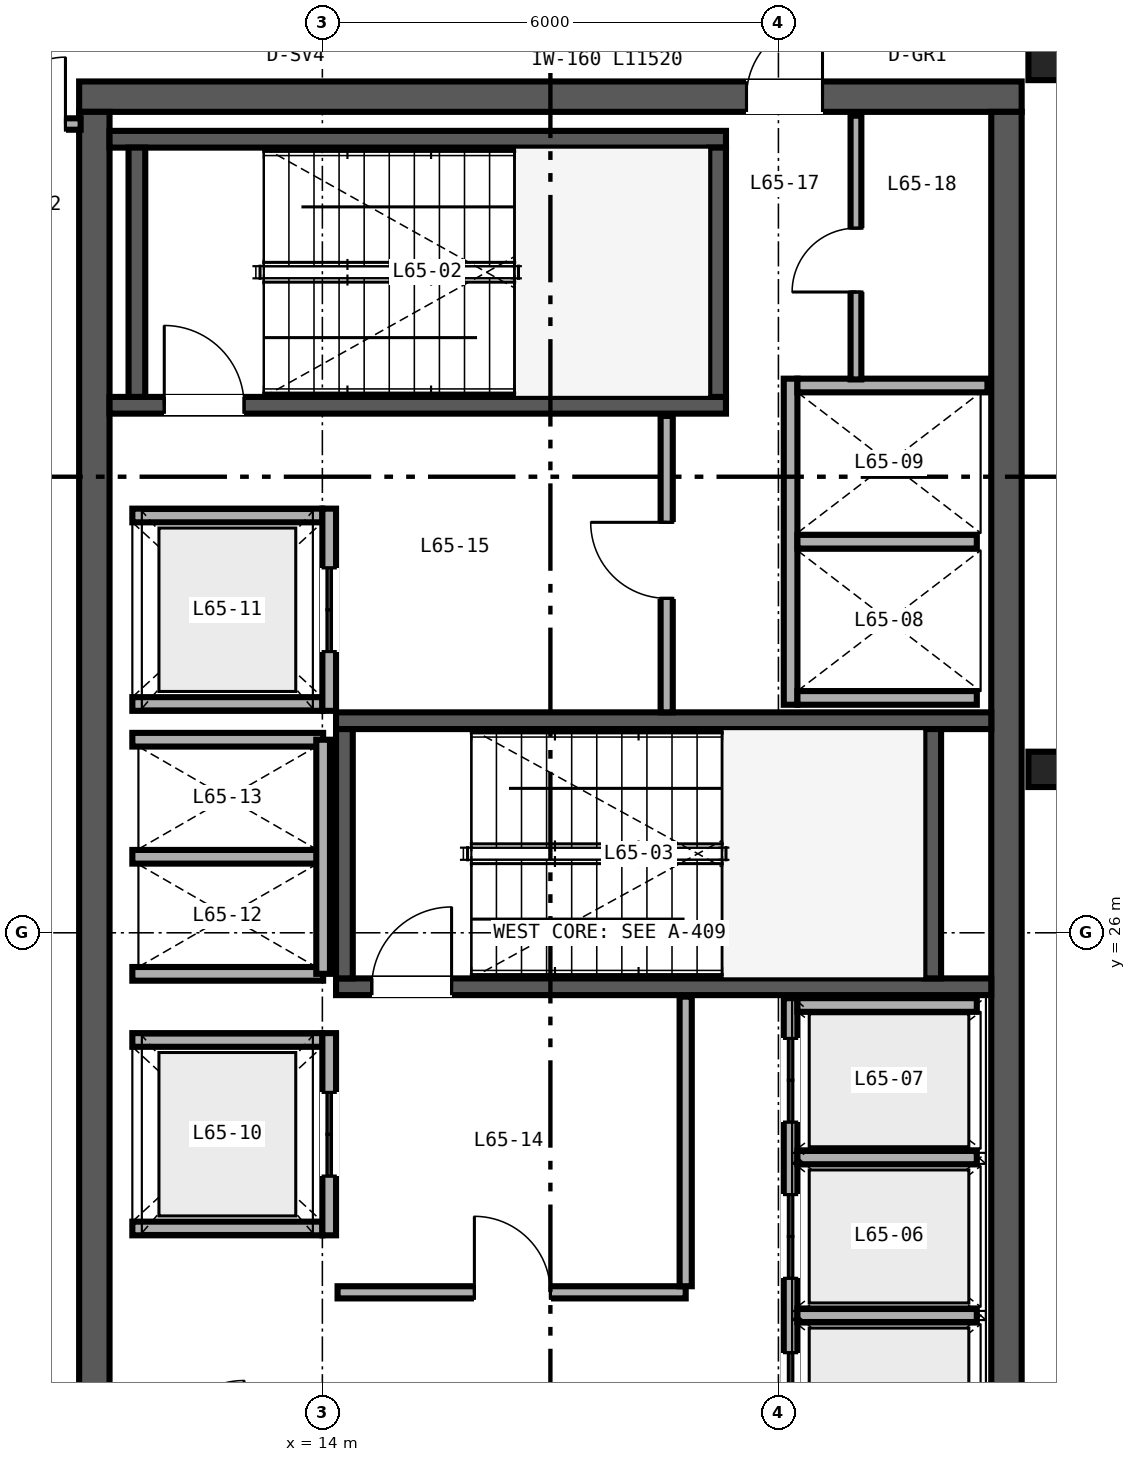
"""IFC4 building model, lengths in metres.
Left out: names, types, materials, properties, quantities, classifications, styles, units other than length and angle.
Written with IfcOpenShell. Run it as: python <this file> out.ifc"""

import sys

from ifc_helpers import new_model, si_unit, direction, frame, frame_2d, origin, origin_2d, place, context, subcontext, project, spatial, rectangle, i_section, extrude, source, transform, mapped, element, fill, save


model = new_model("IFC4")
c1 = context("Model", 3, precision=1e-05, world=origin(), true_north=direction((0.0, 1.0)))
c2 = subcontext(c1, "Body", "Model", "MODEL_VIEW")
j1 = project(units=[si_unit("LENGTHUNIT", "METRE"), si_unit("PLANEANGLEUNIT", "RADIAN")], contexts=[c1])
p1 = place(None, origin())
s1 = spatial("IfcSite", under=j1, at=p1, CompositionType="ELEMENT")
p2 = place(p1, origin())
s2 = spatial("IfcBuilding", under=s1, at=p2, CompositionType="ELEMENT")
p3 = place(p2, frame((0.0, 0.0, 258.0)))
s3 = spatial("IfcBuildingStorey", under=s2, at=p3, CompositionType="ELEMENT", Elevation=258.0)
p4 = place(p3, frame((10.8, 37.0, 0.0), z_axis=(0.0, 0.0, 1.0), x_axis=(1.0, 0.0, 0.0)))
e1 = element("IfcWall", 1, at=p4, inside=s3, PredefinedType="SHEAR", context=c2, shape_type="SweptSolid", body=[
    extrude(rectangle(XDim=12.4, YDim=0.4, at=frame_2d((6.2, 0.0))), origin(), (0.0, 0.0, 1.0), 3.38),
])
p5 = place(p4, frame((8.78, 0.0, 0.0)))
e2 = element("IfcOpeningElement", 2, at=p5, cuts=e1, PredefinedType="OPENING", context=c2, shape_type="SweptSolid", body=[
    extrude(rectangle(XDim=1.0, YDim=2.15, at=frame_2d((0.5, 1.075))), frame((0.0, 0.21, 0.0), z_axis=(0.0, -1.0, 0.0), x_axis=(1.0, 0.0, 0.0)), (0.0, 0.0, 1.0), 0.42),
])
for number, where, z_axis, x_axis in (
    (3, (11.0, 15.2, 0.0), (0.0, 0.0, 1.0), (0.0, 1.0, 0.0)),
    (4, (23.0, 15.2, 0.0), (0.0, 0.0, 1.0), (0.0, 1.0, 0.0)),
):
    element("IfcWall", number, at=place(p3, frame(where, z_axis=z_axis, x_axis=x_axis)), inside=s3, PredefinedType="SHEAR", context=c2, shape_type="SweptSolid", body=[
        extrude(rectangle(XDim=21.6, YDim=0.4, at=frame_2d((10.8, 0.0))), origin(), (0.0, 0.0, 1.0), 3.38),
    ])
p6 = place(p3, frame((11.2, 32.94, 0.0), z_axis=(0.0, 0.0, 1.0), x_axis=(1.0, 0.0, 0.0)))
e5 = element("IfcWall", 5, at=p6, inside=s3, PredefinedType="SHEAR", context=c2, shape_type="SweptSolid", body=[
    extrude(rectangle(XDim=8.11, YDim=0.22, at=frame_2d((4.055, 0.0))), origin(), (0.0, 0.0, 1.0), 3.4),
])
p7 = place(p6, frame((0.72, 0.0, 0.0)))
e6 = element("IfcOpeningElement", 6, at=p7, cuts=e5, PredefinedType="OPENING", context=c2, shape_type="SweptSolid", body=[
    extrude(rectangle(XDim=1.05, YDim=2.15, at=frame_2d((0.525, 1.075))), frame((0.0, 0.12, 0.0), z_axis=(0.0, -1.0, 0.0), x_axis=(1.0, 0.0, 0.0)), (0.0, 0.0, 1.0), 0.24),
])
p8 = place(p3, frame((11.2, 36.44, 0.0), z_axis=(0.0, 0.0, 1.0), x_axis=(1.0, 0.0, 0.0)))
e7 = element("IfcWall", 7, at=p8, inside=s3, PredefinedType="SHEAR", context=c2, shape_type="SweptSolid", body=[
    extrude(rectangle(XDim=8.11, YDim=0.22, at=frame_2d((4.055, 0.0))), origin(), (0.0, 0.0, 1.0), 3.4),
])
for number, where, z_axis, x_axis in (
    (8, (11.56, 33.05, 0.0), (0.0, 0.0, 1.0), (0.0, 1.0, 0.0)),
    (9, (19.2, 33.05, 0.0), (0.0, 0.0, 1.0), (0.0, 1.0, 0.0)),
):
    element("IfcWall", number, at=place(p3, frame(where, z_axis=z_axis, x_axis=x_axis)), inside=s3, PredefinedType="SHEAR", context=c2, shape_type="SweptSolid", body=[
        extrude(rectangle(XDim=3.28, YDim=0.22, at=frame_2d((1.64, 0.0))), origin(), (0.0, 0.0, 1.0), 3.4),
    ])
p9 = place(p3, frame((14.18, 25.29, 0.0), z_axis=(0.0, 0.0, 1.0), x_axis=(1.0, 0.0, 0.0)))
e10 = element("IfcWall", 10, at=p9, inside=s3, PredefinedType="SHEAR", context=c2, shape_type="SweptSolid", body=[
    extrude(rectangle(XDim=8.62, YDim=0.22, at=frame_2d((4.31, 0.0))), origin(), (0.0, 0.0, 1.0), 3.4),
])
p10 = place(p9, frame((0.47, 0.0, 0.0)))
e11 = element("IfcOpeningElement", 11, at=p10, cuts=e10, PredefinedType="OPENING", context=c2, shape_type="SweptSolid", body=[
    extrude(rectangle(XDim=1.05, YDim=2.15, at=frame_2d((0.525, 1.075))), frame((0.0, 0.12, 0.0), z_axis=(0.0, -1.0, 0.0), x_axis=(1.0, 0.0, 0.0)), (0.0, 0.0, 1.0), 0.24),
])
p11 = place(p3, frame((14.18, 28.79, 0.0), z_axis=(0.0, 0.0, 1.0), x_axis=(1.0, 0.0, 0.0)))
e12 = element("IfcWall", 12, at=p11, inside=s3, PredefinedType="SHEAR", context=c2, shape_type="SweptSolid", body=[
    extrude(rectangle(XDim=8.62, YDim=0.22, at=frame_2d((4.31, 0.0))), origin(), (0.0, 0.0, 1.0), 3.4),
])
for number, where, z_axis, x_axis in (
    (13, (14.29, 25.4, 0.0), (0.0, 0.0, 1.0), (0.0, 1.0, 0.0)),
    (14, (22.03, 25.4, 0.0), (0.0, 0.0, 1.0), (0.0, 1.0, 0.0)),
):
    element("IfcWall", number, at=place(p3, frame(where, z_axis=z_axis, x_axis=x_axis)), inside=s3, PredefinedType="SHEAR", context=c2, shape_type="SweptSolid", body=[
        extrude(rectangle(XDim=3.28, YDim=0.22, at=frame_2d((1.64, 0.0))), origin(), (0.0, 0.0, 1.0), 3.4),
    ])
m1 = source(origin(), c2, "Body", "SweptSolid", [
    extrude(i_section(OverallWidth=0.422, OverallDepth=0.465, WebThickness=0.045, FlangeThickness=0.073, FilletRadius=0.025, at=origin_2d()), origin(), (0.0, 0.0, 1.0), 3.38),
])
for number, where, z_axis, x_axis in (
    (15, (23.5, 28.15, 0.0), (0.0, 0.0, 1.0), (1.0, 0.0, 0.0)),
    (16, (23.5, 37.45, 0.0), (0.0, 0.0, 1.0), (1.0, 0.0, 0.0)),
):
    element("IfcColumn", number, at=place(p3, frame(where, z_axis=z_axis, x_axis=x_axis)), inside=s3, PredefinedType="COLUMN", context=c2, shape_type="MappedRepresentation", body=[
        mapped(m1, transform((0.0, 0.0, 0.0), scale=1.0)),
    ])
p12 = place(p3, frame((20.16, 18.82, 0.0), z_axis=(0.0, 0.0, 1.0), x_axis=(0.0, 1.0, 0.0)))
e17 = element("IfcWall", 17, at=p12, inside=s3, PredefinedType="SOLIDWALL", context=c2, shape_type="SweptSolid", body=[
    extrude(rectangle(XDim=6.32, YDim=0.18, at=frame_2d((3.16, 0.0))), origin(), (0.0, 0.0, 1.0), 2.48),
])
p13 = place(p12, frame((0.555, 0.0, 0.0)))
e18 = element("IfcOpeningElement", 18, at=p13, cuts=e17, PredefinedType="OPENING", context=c2, shape_type="SweptSolid", body=[
    extrude(rectangle(XDim=1.1, YDim=2.2, at=frame_2d((0.55, 1.1))), frame((0.0, 0.1, 0.0), z_axis=(0.0, -1.0, 0.0), x_axis=(1.0, 0.0, 0.0)), (0.0, 0.0, 1.0), 0.2),
])
p14 = place(p12, frame((2.635, 0.0, 0.0)))
e19 = element("IfcOpeningElement", 19, at=p14, cuts=e17, PredefinedType="OPENING", context=c2, shape_type="SweptSolid", body=[
    extrude(rectangle(XDim=1.1, YDim=2.2, at=frame_2d((0.55, 1.1))), frame((0.0, 0.1, 0.0), z_axis=(0.0, -1.0, 0.0), x_axis=(1.0, 0.0, 0.0)), (0.0, 0.0, 1.0), 0.2),
])
p15 = place(p12, frame((4.69, 0.0, 0.0)))
e20 = element("IfcOpeningElement", 20, at=p15, cuts=e17, PredefinedType="OPENING", context=c2, shape_type="SweptSolid", body=[
    extrude(rectangle(XDim=1.1, YDim=2.2, at=frame_2d((0.55, 1.1))), frame((0.0, 0.1, 0.0), z_axis=(0.0, -1.0, 0.0), x_axis=(1.0, 0.0, 0.0)), (0.0, 0.0, 1.0), 0.2),
])
p16 = place(p3, frame((20.25, 25.05, 0.0), z_axis=(0.0, 0.0, 1.0), x_axis=(1.0, 0.0, 0.0)))
e21 = element("IfcWall", 21, at=p16, inside=s3, PredefinedType="SOLIDWALL", context=c2, shape_type="SweptSolid", body=[
    extrude(rectangle(XDim=2.36, YDim=0.18, at=frame_2d((1.18, 0.0))), origin(), (0.0, 0.0, 1.0), 3.38),
])
p17 = place(p3, frame((20.25, 20.965, 0.0), z_axis=(0.0, 0.0, 1.0), x_axis=(1.0, 0.0, 0.0)))
e22 = element("IfcWall", 22, at=p17, inside=s3, PredefinedType="SOLIDWALL", context=c2, shape_type="SweptSolid", body=[
    extrude(rectangle(XDim=2.36, YDim=0.18, at=frame_2d((1.18, 0.0))), origin(), (0.0, 0.0, 1.0), 2.48),
])
p18 = place(p3, frame((20.25, 23.045, 0.0), z_axis=(0.0, 0.0, 1.0), x_axis=(1.0, 0.0, 0.0)))
e23 = element("IfcWall", 23, at=p18, inside=s3, PredefinedType="SOLIDWALL", context=c2, shape_type="SweptSolid", body=[
    extrude(rectangle(XDim=2.36, YDim=0.18, at=frame_2d((1.18, 0.0))), origin(), (0.0, 0.0, 1.0), 3.38),
])
p19 = place(p3, frame((20.16, 29.0, 0.0), z_axis=(0.0, 0.0, 1.0), x_axis=(0.0, 1.0, 0.0)))
e24 = element("IfcWall", 24, at=p19, inside=s3, PredefinedType="SOLIDWALL", context=c2, shape_type="SweptSolid", body=[
    extrude(rectangle(XDim=4.29, YDim=0.18, at=frame_2d((2.145, 0.0))), origin(), (0.0, 0.0, 1.0), 3.38),
])
p20 = place(p3, frame((20.25, 29.09, 0.0), z_axis=(0.0, 0.0, 1.0), x_axis=(1.0, 0.0, 0.0)))
e25 = element("IfcWall", 25, at=p20, inside=s3, PredefinedType="SOLIDWALL", context=c2, shape_type="SweptSolid", body=[
    extrude(rectangle(XDim=2.36, YDim=0.18, at=frame_2d((1.18, 0.0))), origin(), (0.0, 0.0, 1.0), 3.38),
])
p21 = place(p3, frame((20.25, 33.2, 0.0), z_axis=(0.0, 0.0, 1.0), x_axis=(1.0, 0.0, 0.0)))
e26 = element("IfcWall", 26, at=p21, inside=s3, PredefinedType="SOLIDWALL", context=c2, shape_type="SweptSolid", body=[
    extrude(rectangle(XDim=2.5, YDim=0.18, at=frame_2d((1.25, 0.0))), origin(), (0.0, 0.0, 1.0), 3.38),
])
p22 = place(p3, frame((20.25, 31.145, 0.0), z_axis=(0.0, 0.0, 1.0), x_axis=(1.0, 0.0, 0.0)))
e27 = element("IfcWall", 27, at=p22, inside=s3, PredefinedType="SOLIDWALL", context=c2, shape_type="SweptSolid", body=[
    extrude(rectangle(XDim=2.36, YDim=0.18, at=frame_2d((1.18, 0.0))), origin(), (0.0, 0.0, 1.0), 3.38),
])
for number, where, z_axis, x_axis in (
    (28, (11.5, 22.11, 0.0), (0.0, 0.0, 1.0), (1.0, 0.0, 0.0)),
    (29, (11.5, 24.59, 0.0), (0.0, 0.0, 1.0), (1.0, 0.0, 0.0)),
):
    element("IfcWall", number, at=place(p3, frame(where, z_axis=z_axis, x_axis=x_axis)), inside=s3, PredefinedType="SOLIDWALL", context=c2, shape_type="SweptSolid", body=[
        extrude(rectangle(XDim=2.5, YDim=0.18, at=frame_2d((1.25, 0.0))), origin(), (0.0, 0.0, 1.0), 3.38),
    ])
p23 = place(p3, frame((14.09, 22.02, 0.0), z_axis=(0.0, 0.0, 1.0), x_axis=(0.0, 1.0, 0.0)))
e30 = element("IfcWall", 30, at=p23, inside=s3, PredefinedType="SOLIDWALL", context=c2, shape_type="SweptSolid", body=[
    extrude(rectangle(XDim=2.66, YDim=0.18, at=frame_2d((1.33, 0.0))), origin(), (0.0, 0.0, 1.0), 3.38),
])
p24 = place(p23, frame((0.78, 0.0, 0.0)))
e31 = element("IfcOpeningElement", 31, at=p24, cuts=e30, PredefinedType="OPENING", context=c2, shape_type="SweptSolid", body=[
    extrude(rectangle(XDim=1.1, YDim=2.2, at=frame_2d((0.55, 1.1))), frame((0.0, 0.1, 0.0), z_axis=(0.0, -1.0, 0.0), x_axis=(1.0, 0.0, 0.0)), (0.0, 0.0, 1.0), 0.2),
])
for number, where, z_axis, x_axis in (
    (32, (11.5, 29.01, 0.0), (0.0, 0.0, 1.0), (1.0, 0.0, 0.0)),
    (33, (11.5, 31.49, 0.0), (0.0, 0.0, 1.0), (1.0, 0.0, 0.0)),
):
    element("IfcWall", number, at=place(p3, frame(where, z_axis=z_axis, x_axis=x_axis)), inside=s3, PredefinedType="SOLIDWALL", context=c2, shape_type="SweptSolid", body=[
        extrude(rectangle(XDim=2.5, YDim=0.18, at=frame_2d((1.25, 0.0))), origin(), (0.0, 0.0, 1.0), 3.38),
    ])
p25 = place(p3, frame((14.09, 28.92, 0.0), z_axis=(0.0, 0.0, 1.0), x_axis=(0.0, 1.0, 0.0)))
e34 = element("IfcWall", 34, at=p25, inside=s3, PredefinedType="SOLIDWALL", context=c2, shape_type="SweptSolid", body=[
    extrude(rectangle(XDim=2.66, YDim=0.18, at=frame_2d((1.33, 0.0))), origin(), (0.0, 0.0, 1.0), 3.38),
])
p26 = place(p25, frame((0.78, 0.0, 0.0)))
e35 = element("IfcOpeningElement", 35, at=p26, cuts=e34, PredefinedType="OPENING", context=c2, shape_type="SweptSolid", body=[
    extrude(rectangle(XDim=1.1, YDim=2.2, at=frame_2d((0.55, 1.1))), frame((0.0, 0.1, 0.0), z_axis=(0.0, -1.0, 0.0), x_axis=(1.0, 0.0, 0.0)), (0.0, 0.0, 1.0), 0.2),
])
for number, where, z_axis, x_axis in (
    (36, (11.5, 25.46, 0.0), (0.0, 0.0, 1.0), (1.0, 0.0, 0.0)),
    (37, (11.5, 27.0, 0.0), (0.0, 0.0, 1.0), (1.0, 0.0, 0.0)),
    (38, (11.5, 28.54, 0.0), (0.0, 0.0, 1.0), (1.0, 0.0, 0.0)),
):
    element("IfcWall", number, at=place(p3, frame(where, z_axis=z_axis, x_axis=x_axis)), inside=s3, PredefinedType="SOLIDWALL", context=c2, shape_type="SweptSolid", body=[
        extrude(rectangle(XDim=2.51, YDim=0.18, at=frame_2d((1.255, 0.0))), origin(), (0.0, 0.0, 1.0), 3.38),
    ])
p27 = place(p3, frame((14.01, 25.46, 0.0), z_axis=(0.0, 0.0, 1.0), x_axis=(0.0, 1.0, 0.0)))
e39 = element("IfcWall", 39, at=p27, inside=s3, PredefinedType="SOLIDWALL", context=c2, shape_type="SweptSolid", body=[
    extrude(rectangle(XDim=3.08, YDim=0.18, at=frame_2d((1.54, 0.0))), origin(), (0.0, 0.0, 1.0), 3.38),
])
p28 = place(p3, frame((14.2, 21.27, 0.0), z_axis=(0.0, 0.0, 1.0), x_axis=(1.0, 0.0, 0.0)))
e40 = element("IfcWall", 40, at=p28, inside=s3, PredefinedType="PARTITIONING", context=c2, shape_type="SweptSolid", body=[
    extrude(rectangle(XDim=4.58, YDim=0.16, at=frame_2d((2.29, 0.0))), origin(), (0.0, 0.0, 1.0), 3.38),
])
p29 = place(p28, frame((1.8, 0.0, 0.0)))
e41 = element("IfcOpeningElement", 41, at=p29, cuts=e40, PredefinedType="OPENING", context=c2, shape_type="SweptSolid", body=[
    extrude(rectangle(XDim=1.0, YDim=2.15, at=frame_2d((0.5, 1.075))), frame((0.0, 0.09, 0.0), z_axis=(0.0, -1.0, 0.0), x_axis=(1.0, 0.0, 0.0)), (0.0, 0.0, 1.0), 0.18),
])
p30 = place(p3, frame((18.78, 21.35, 0.0), z_axis=(0.0, 0.0, 1.0), x_axis=(0.0, 1.0, 0.0)))
e42 = element("IfcWall", 42, at=p30, inside=s3, PredefinedType="PARTITIONING", context=c2, shape_type="SweptSolid", body=[
    extrude(rectangle(XDim=3.81, YDim=0.16, at=frame_2d((1.905, 0.0))), origin(), (0.0, 0.0, 1.0), 3.38),
])
p31 = place(p3, frame((18.53, 28.9, 0.0), z_axis=(0.0, 0.0, 1.0), x_axis=(0.0, 1.0, 0.0)))
e43 = element("IfcWall", 43, at=p31, inside=s3, PredefinedType="PARTITIONING", context=c2, shape_type="SweptSolid", body=[
    extrude(rectangle(XDim=3.9, YDim=0.16, at=frame_2d((1.95, 0.0))), origin(), (0.0, 0.0, 1.0), 3.38),
])
p32 = place(p31, frame((1.5, 0.0, 0.0)))
e44 = element("IfcOpeningElement", 44, at=p32, cuts=e43, PredefinedType="OPENING", context=c2, shape_type="SweptSolid", body=[
    extrude(rectangle(XDim=1.0, YDim=2.15, at=frame_2d((0.5, 1.075))), frame((0.0, 0.09, 0.0), z_axis=(0.0, -1.0, 0.0), x_axis=(1.0, 0.0, 0.0)), (0.0, 0.0, 1.0), 0.18),
])
p33 = place(p3, frame((21.02, 33.28, 0.0), z_axis=(0.0, 0.0, 1.0), x_axis=(0.0, 1.0, 0.0)))
e45 = element("IfcWall", 45, at=p33, inside=s3, PredefinedType="PARTITIONING", context=c2, shape_type="SweptSolid", body=[
    extrude(rectangle(XDim=3.47, YDim=0.142, at=frame_2d((1.735, 0.0))), origin(), (0.0, 0.0, 1.0), 3.38),
])
p34 = place(p33, frame((1.15, 0.0, 0.0)))
e46 = element("IfcOpeningElement", 46, at=p34, cuts=e45, PredefinedType="OPENING", context=c2, shape_type="SweptSolid", body=[
    extrude(rectangle(XDim=0.84, YDim=2.1, at=frame_2d((0.42, 1.05))), frame((0.0, 0.081, 0.0), z_axis=(0.0, -1.0, 0.0), x_axis=(1.0, 0.0, 0.0)), (0.0, 0.0, 1.0), 0.162),
])
p35 = place(p3, frame((8.16, 36.64, 0.0), z_axis=(0.0, 0.0, 1.0), x_axis=(1.0, 0.0, 0.0)))
e47 = element("IfcWall", 47, at=p35, inside=s3, PredefinedType="PARTITIONING", context=c2, shape_type="SweptSolid", body=[
    extrude(rectangle(XDim=2.66, YDim=0.15, at=frame_2d((1.33, 0.0))), origin(), (0.0, 0.0, 1.0), 2.763),
])
p36 = place(p35, frame((1.58, 0.0, 0.0)))
e48 = element("IfcOpeningElement", 48, at=p36, cuts=e47, PredefinedType="OPENING", context=c2, shape_type="SweptSolid", body=[
    extrude(rectangle(XDim=0.88, YDim=2.15, at=frame_2d((0.44, 1.075))), frame((0.0, 0.085, 0.0), z_axis=(0.0, -1.0, 0.0), x_axis=(1.0, 0.0, 0.0)), (0.0, 0.0, 1.0), 0.17),
])
m2 = source(origin(), c2, "Body", "SweptSolid", [
    extrude(rectangle(XDim=1.05, YDim=2.15, at=frame_2d((0.525, 1.075))), frame((0.0, 0.025, 0.0), z_axis=(0.0, -1.0, 0.0), x_axis=(1.0, 0.0, 0.0)), (0.0, 0.0, 1.0), 0.05),
])
p37 = place(p7, origin())
e49 = element("IfcDoor", 49, at=p37, inside=s3, OperationType="SINGLE_SWING_LEFT", PredefinedType="DOOR", context=c2, shape_type="MappedRepresentation", body=[
    mapped(m2, transform((0.0, 0.0, 0.0), scale=1.0)),
])
fill(e6, e49)
p38 = place(p10, origin())
e50 = element("IfcDoor", 50, at=p38, inside=s3, OperationType="SINGLE_SWING_RIGHT", PredefinedType="DOOR", context=c2, shape_type="MappedRepresentation", body=[
    mapped(m2, transform((0.0, 0.0, 0.0), scale=1.0)),
])
fill(e11, e50)
m3 = source(origin(), c2, "Body", "SweptSolid", [
    extrude(rectangle(XDim=1.1, YDim=2.2, at=frame_2d((0.55, 1.1))), frame((0.0, 0.025, 0.0), z_axis=(0.0, -1.0, 0.0), x_axis=(1.0, 0.0, 0.0)), (0.0, 0.0, 1.0), 0.05),
])
p39 = place(p13, origin())
e51 = element("IfcDoor", 51, at=p39, inside=s3, OperationType="DOUBLE_DOOR_SLIDING", PredefinedType="DOOR", context=c2, shape_type="MappedRepresentation", body=[
    mapped(m3, transform((0.0, 0.0, 0.0), scale=1.0)),
])
fill(e18, e51)
p40 = place(p14, origin())
e52 = element("IfcDoor", 52, at=p40, inside=s3, OperationType="DOUBLE_DOOR_SLIDING", PredefinedType="DOOR", context=c2, shape_type="MappedRepresentation", body=[
    mapped(m3, transform((0.0, 0.0, 0.0), scale=1.0)),
])
fill(e19, e52)
p41 = place(p15, origin())
e53 = element("IfcDoor", 53, at=p41, inside=s3, OperationType="DOUBLE_DOOR_SLIDING", PredefinedType="DOOR", context=c2, shape_type="MappedRepresentation", body=[
    mapped(m3, transform((0.0, 0.0, 0.0), scale=1.0)),
])
fill(e20, e53)
p42 = place(p24, origin())
e54 = element("IfcDoor", 54, at=p42, inside=s3, OperationType="DOUBLE_DOOR_SLIDING", PredefinedType="DOOR", context=c2, shape_type="MappedRepresentation", body=[
    mapped(m3, transform((0.0, 0.0, 0.0), scale=1.0)),
])
fill(e31, e54)
p43 = place(p26, origin())
e55 = element("IfcDoor", 55, at=p43, inside=s3, OperationType="DOUBLE_DOOR_SLIDING", PredefinedType="DOOR", context=c2, shape_type="MappedRepresentation", body=[
    mapped(m3, transform((0.0, 0.0, 0.0), scale=1.0)),
])
fill(e35, e55)
m4 = source(origin(), c2, "Body", "SweptSolid", [
    extrude(rectangle(XDim=1.0, YDim=2.15, at=frame_2d((0.5, 1.075))), frame((0.0, 0.025, 0.0), z_axis=(0.0, -1.0, 0.0), x_axis=(1.0, 0.0, 0.0)), (0.0, 0.0, 1.0), 0.05),
])
p44 = place(p29, origin())
e56 = element("IfcDoor", 56, at=p44, inside=s3, OperationType="SINGLE_SWING_LEFT", PredefinedType="DOOR", context=c2, shape_type="MappedRepresentation", body=[
    mapped(m4, transform((0.0, 0.0, 0.0), scale=1.0)),
])
fill(e41, e56)
p45 = place(p32, origin())
e57 = element("IfcDoor", 57, at=p45, inside=s3, OperationType="SINGLE_SWING_RIGHT", PredefinedType="DOOR", context=c2, shape_type="MappedRepresentation", body=[
    mapped(m4, transform((0.0, 0.0, 0.0), scale=1.0)),
])
fill(e44, e57)
m5 = source(origin(), c2, "Body", "SweptSolid", [
    extrude(rectangle(XDim=0.84, YDim=2.1, at=frame_2d((0.42, 1.05))), frame((0.0, 0.025, 0.0), z_axis=(0.0, -1.0, 0.0), x_axis=(1.0, 0.0, 0.0)), (0.0, 0.0, 1.0), 0.05),
])
p46 = place(p34, origin())
e58 = element("IfcDoor", 58, at=p46, inside=s3, OperationType="SINGLE_SWING_LEFT", PredefinedType="DOOR", context=c2, shape_type="MappedRepresentation", body=[
    mapped(m5, transform((0.0, 0.0, 0.0), scale=1.0)),
])
fill(e46, e58)
p47 = place(p5, origin())
e59 = element("IfcDoor", 59, at=p47, inside=s3, OperationType="SINGLE_SWING_RIGHT", PredefinedType="DOOR", context=c2, shape_type="MappedRepresentation", body=[
    mapped(m4, transform((0.0, 0.0, 0.0), scale=1.0)),
])
fill(e2, e59)
m6 = source(origin(), c2, "Body", "SweptSolid", [
    extrude(rectangle(XDim=0.88, YDim=2.15, at=frame_2d((0.44, 1.075))), frame((0.0, 0.025, 0.0), z_axis=(0.0, -1.0, 0.0), x_axis=(1.0, 0.0, 0.0)), (0.0, 0.0, 1.0), 0.05),
])
p48 = place(p36, origin())
e60 = element("IfcDoor", 60, at=p48, inside=s3, OperationType="SINGLE_SWING_RIGHT", PredefinedType="DOOR", context=c2, shape_type="MappedRepresentation", body=[
    mapped(m6, transform((0.0, 0.0, 0.0), scale=1.0)),
])
fill(e48, e60)
save(model, sys.argv[1])
